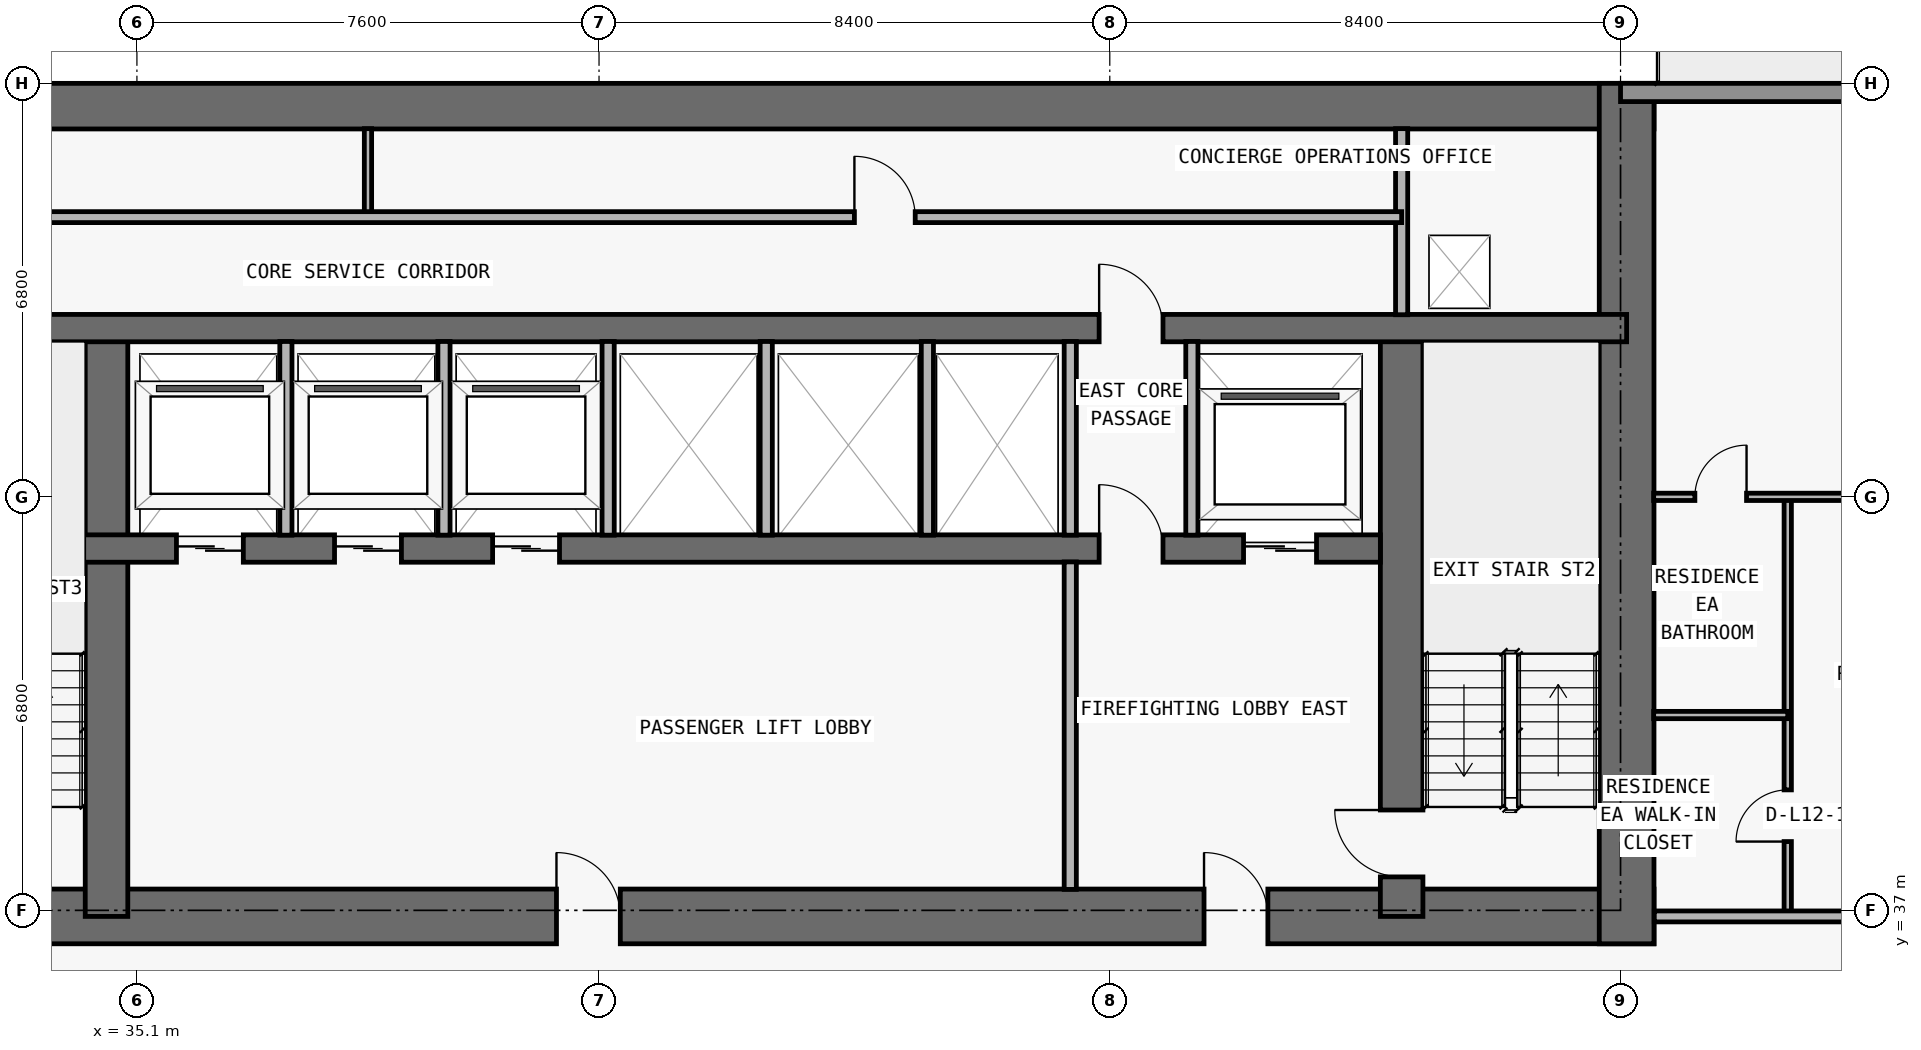
"""IFC4 building model, lengths in metres.
Left out: names, types, materials, properties, quantities, classifications, styles, units other than length and angle.
Written with IfcOpenShell. Run it as: python <this file> out.ifc"""

import sys

from ifc_helpers import new_model, si_unit, direction, frame, frame_2d, origin, place, context, subcontext, project, spatial, rectangle, extrude, element, fill, save


model = new_model("IFC4")
c1 = context("Model", 3, precision=1e-05, world=origin(), true_north=direction((0.0, 1.0)))
c2 = subcontext(c1, "Body", "Model", "MODEL_VIEW")
j1 = project(units=[si_unit("LENGTHUNIT", "METRE"), si_unit("PLANEANGLEUNIT", "RADIAN")], contexts=[c1])
p1 = place(None, origin())
s1 = spatial("IfcSite", under=j1, at=p1, CompositionType="ELEMENT")
p2 = place(p1, origin())
s2 = spatial("IfcBuilding", under=s1, at=p2, CompositionType="ELEMENT")
p3 = place(p2, frame((0.0, 0.0, 49.8)))
s3 = spatial("IfcBuildingStorey", under=s2, at=p3, CompositionType="ELEMENT", Elevation=49.8)
p4 = place(p3, frame((17.75, 36.9, 0.0), z_axis=(0.0, 0.0, 1.0), x_axis=(1.0, 0.0, 0.0)))
e1 = element("IfcWall", 1, at=p4, inside=s3, PredefinedType="SHEAR", context=c2, shape_type="SweptSolid", body=[
    extrude(rectangle(XDim=42.3, YDim=0.9, at=frame_2d((21.15, 0.0))), origin(), (0.0, 0.0, 1.0), 3.05),
])
p5 = place(p4, frame((14.55, 0.0, 0.0)))
e2 = element("IfcOpeningElement", 2, at=p5, cuts=e1, PredefinedType="OPENING", context=c2, shape_type="SweptSolid", body=[
    extrude(rectangle(XDim=1.1, YDim=2.15, at=frame_2d((0.55, 1.075))), frame((0.0, 0.46, 0.0), z_axis=(0.0, -1.0, 0.0), x_axis=(1.0, 0.0, 0.0)), (0.0, 0.0, 1.0), 0.92),
])
p6 = place(p4, frame((6.4, 0.0, 0.0)))
e3 = element("IfcOpeningElement", 3, at=p6, cuts=e1, PredefinedType="OPENING", context=c2, shape_type="SweptSolid", body=[
    extrude(rectangle(XDim=1.05, YDim=2.15, at=frame_2d((0.525, 1.075))), frame((0.0, 0.46, 0.0), z_axis=(0.0, -1.0, 0.0), x_axis=(1.0, 0.0, 0.0)), (0.0, 0.0, 1.0), 0.92),
])
p7 = place(p4, frame((34.9, 0.0, 0.0)))
e4 = element("IfcOpeningElement", 4, at=p7, cuts=e1, PredefinedType="OPENING", context=c2, shape_type="SweptSolid", body=[
    extrude(rectangle(XDim=1.05, YDim=2.15, at=frame_2d((0.525, 1.075))), frame((0.0, 0.46, 0.0), z_axis=(0.0, -1.0, 0.0), x_axis=(1.0, 0.0, 0.0)), (0.0, 0.0, 1.0), 0.92),
])
p8 = place(p4, frame((11.012, 0.0, 0.0)))
e5 = element("IfcOpeningElement", 5, at=p8, cuts=e1, PredefinedType="OPENING", context=c2, shape_type="SweptSolid", body=[
    extrude(rectangle(XDim=1.05, YDim=2.15, at=frame_2d((0.525, 1.075))), frame((0.0, 0.46, 0.0), z_axis=(0.0, -1.0, 0.0), x_axis=(1.0, 0.0, 0.0)), (0.0, 0.0, 1.0), 0.92),
])
p9 = place(p4, frame((24.25, 0.0, 0.0)))
e6 = element("IfcOpeningElement", 6, at=p9, cuts=e1, PredefinedType="OPENING", context=c2, shape_type="SweptSolid", body=[
    extrude(rectangle(XDim=1.05, YDim=2.15, at=frame_2d((0.525, 1.075))), frame((0.0, 0.46, 0.0), z_axis=(0.0, -1.0, 0.0), x_axis=(1.0, 0.0, 0.0)), (0.0, 0.0, 1.0), 0.92),
])
p10 = place(p3, frame((17.75, 50.225, 0.0), z_axis=(0.0, 0.0, 1.0), x_axis=(1.0, 0.0, 0.0)))
e7 = element("IfcWall", 7, at=p10, inside=s3, PredefinedType="SHEAR", context=c2, shape_type="SweptSolid", body=[
    extrude(rectangle(XDim=42.3, YDim=0.75, at=frame_2d((21.15, 0.0))), origin(), (0.0, 0.0, 1.0), 3.05),
])
p11 = place(p3, frame((59.6, 36.45, 0.0), z_axis=(0.0, 0.0, 1.0), x_axis=(0.0, 1.0, 0.0)))
e8 = element("IfcWall", 8, at=p11, inside=s3, PredefinedType="SHEAR", context=c2, shape_type="SweptSolid", body=[
    extrude(rectangle(XDim=14.15, YDim=0.9, at=frame_2d((7.075, 0.0))), origin(), (0.0, 0.0, 1.0), 3.05),
])
p12 = place(p3, frame((55.9, 36.9, 0.0), z_axis=(0.0, 0.0, 1.0), x_axis=(0.0, 1.0, 0.0)))
e9 = element("IfcWall", 9, at=p12, inside=s3, PredefinedType="SHEAR", context=c2, shape_type="SweptSolid", body=[
    extrude(rectangle(XDim=9.675, YDim=0.7, at=frame_2d((4.837, 0.0))), origin(), (0.0, 0.0, 1.0), 3.05),
])
p13 = place(p12, frame((0.65, 0.0, 0.0)))
e10 = element("IfcOpeningElement", 10, at=p13, cuts=e9, PredefinedType="OPENING", context=c2, shape_type="SweptSolid", body=[
    extrude(rectangle(XDim=1.1, YDim=2.15, at=frame_2d((0.55, 1.075))), frame((0.0, 0.36, 0.0), z_axis=(0.0, -1.0, 0.0), x_axis=(1.0, 0.0, 0.0)), (0.0, 0.0, 1.0), 0.72),
])
p14 = place(p3, frame((34.6, 36.9, 0.0), z_axis=(0.0, 0.0, 1.0), x_axis=(0.0, 1.0, 0.0)))
e11 = element("IfcWall", 11, at=p14, inside=s3, PredefinedType="SHEAR", context=c2, shape_type="SweptSolid", body=[
    extrude(rectangle(XDim=9.675, YDim=0.7, at=frame_2d((4.837, 0.0))), origin(), (0.0, 0.0, 1.0), 3.05),
])
p15 = place(p3, frame((22.25, 42.95, 0.0), z_axis=(0.0, 0.0, 1.0), x_axis=(1.0, 0.0, 0.0)))
e12 = element("IfcWall", 12, at=p15, inside=s3, PredefinedType="SHEAR", context=c2, shape_type="SweptSolid", body=[
    extrude(rectangle(XDim=33.3, YDim=0.45, at=frame_2d((16.65, 0.0))), origin(), (0.0, 0.0, 1.0), 3.05),
])
p16 = place(p15, frame((1.05, 0.0, 0.0)))
e13 = element("IfcOpeningElement", 13, at=p16, cuts=e12, PredefinedType="OPENING", context=c2, shape_type="SweptSolid", body=[
    extrude(rectangle(XDim=1.2, YDim=2.2, at=frame_2d((0.6, 1.1))), frame((0.0, 0.235, 0.0), z_axis=(0.0, -1.0, 0.0), x_axis=(1.0, 0.0, 0.0)), (0.0, 0.0, 1.0), 0.47),
])
p17 = place(p15, frame((31.05, 0.0, 0.0)))
e14 = element("IfcOpeningElement", 14, at=p17, cuts=e12, PredefinedType="OPENING", context=c2, shape_type="SweptSolid", body=[
    extrude(rectangle(XDim=1.2, YDim=2.2, at=frame_2d((0.6, 1.1))), frame((0.0, 0.235, 0.0), z_axis=(0.0, -1.0, 0.0), x_axis=(1.0, 0.0, 0.0)), (0.0, 0.0, 1.0), 0.47),
])
p18 = place(p15, frame((13.5, 0.0, 0.0)))
e15 = element("IfcOpeningElement", 15, at=p18, cuts=e12, PredefinedType="OPENING", context=c2, shape_type="SweptSolid", body=[
    extrude(rectangle(XDim=1.1, YDim=2.2, at=frame_2d((0.55, 1.1))), frame((0.0, 0.235, 0.0), z_axis=(0.0, -1.0, 0.0), x_axis=(1.0, 0.0, 0.0)), (0.0, 0.0, 1.0), 0.47),
])
p19 = place(p15, frame((16.1, 0.0, 0.0)))
e16 = element("IfcOpeningElement", 16, at=p19, cuts=e12, PredefinedType="OPENING", context=c2, shape_type="SweptSolid", body=[
    extrude(rectangle(XDim=1.1, YDim=2.2, at=frame_2d((0.55, 1.1))), frame((0.0, 0.235, 0.0), z_axis=(0.0, -1.0, 0.0), x_axis=(1.0, 0.0, 0.0)), (0.0, 0.0, 1.0), 0.47),
])
p20 = place(p15, frame((18.7, 0.0, 0.0)))
e17 = element("IfcOpeningElement", 17, at=p20, cuts=e12, PredefinedType="OPENING", context=c2, shape_type="SweptSolid", body=[
    extrude(rectangle(XDim=1.1, YDim=2.2, at=frame_2d((0.55, 1.1))), frame((0.0, 0.235, 0.0), z_axis=(0.0, -1.0, 0.0), x_axis=(1.0, 0.0, 0.0)), (0.0, 0.0, 1.0), 0.47),
])
p21 = place(p15, frame((3.625, 0.0, 0.0)))
e18 = element("IfcOpeningElement", 18, at=p21, cuts=e12, PredefinedType="OPENING", context=c2, shape_type="SweptSolid", body=[
    extrude(rectangle(XDim=1.05, YDim=2.15, at=frame_2d((0.525, 1.075))), frame((0.0, 0.235, 0.0), z_axis=(0.0, -1.0, 0.0), x_axis=(1.0, 0.0, 0.0)), (0.0, 0.0, 1.0), 0.47),
])
p22 = place(p15, frame((28.675, 0.0, 0.0)))
e19 = element("IfcOpeningElement", 19, at=p22, cuts=e12, PredefinedType="OPENING", context=c2, shape_type="SweptSolid", body=[
    extrude(rectangle(XDim=1.05, YDim=2.15, at=frame_2d((0.525, 1.075))), frame((0.0, 0.235, 0.0), z_axis=(0.0, -1.0, 0.0), x_axis=(1.0, 0.0, 0.0)), (0.0, 0.0, 1.0), 0.47),
])
p23 = place(p3, frame((18.2, 46.575, 0.0), z_axis=(0.0, 0.0, 1.0), x_axis=(1.0, 0.0, 0.0)))
e20 = element("IfcWall", 20, at=p23, inside=s3, PredefinedType="SHEAR", context=c2, shape_type="SweptSolid", body=[
    extrude(rectangle(XDim=41.4, YDim=0.45, at=frame_2d((20.7, 0.0))), origin(), (0.0, 0.0, 1.0), 3.05),
])
p24 = place(p23, frame((7.675, 0.0, 0.0)))
e21 = element("IfcOpeningElement", 21, at=p24, cuts=e20, PredefinedType="OPENING", context=c2, shape_type="SweptSolid", body=[
    extrude(rectangle(XDim=1.05, YDim=2.15, at=frame_2d((0.525, 1.075))), frame((0.0, 0.235, 0.0), z_axis=(0.0, -1.0, 0.0), x_axis=(1.0, 0.0, 0.0)), (0.0, 0.0, 1.0), 0.47),
])
p25 = place(p23, frame((32.725, 0.0, 0.0)))
e22 = element("IfcOpeningElement", 22, at=p25, cuts=e20, PredefinedType="OPENING", context=c2, shape_type="SweptSolid", body=[
    extrude(rectangle(XDim=1.05, YDim=2.15, at=frame_2d((0.525, 1.075))), frame((0.0, 0.235, 0.0), z_axis=(0.0, -1.0, 0.0), x_axis=(1.0, 0.0, 0.0)), (0.0, 0.0, 1.0), 0.47),
])
p26 = place(p3, frame((59.5, 50.45, 0.0), z_axis=(0.0, 0.0, 1.0), x_axis=(1.0, 0.0, 0.0)))
e23 = element("IfcWall", 23, at=p26, inside=s3, PredefinedType="STANDARD", context=c2, shape_type="SweptSolid", body=[
    extrude(rectangle(XDim=13.2, YDim=0.3, at=frame_2d((6.6, 0.0))), origin(), (0.0, 0.0, 1.0), 3.05),
])
p27 = place(p26, frame((5.6, 0.0, 0.0)))
e24 = element("IfcOpeningElement", 24, at=p27, cuts=e23, PredefinedType="OPENING", context=c2, shape_type="SweptSolid", body=[
    extrude(rectangle(XDim=2.0, YDim=2.3, at=frame_2d((1.0, 1.15))), frame((0.0, 0.16, 0.0), z_axis=(0.0, -1.0, 0.0), x_axis=(1.0, 0.0, 0.0)), (0.0, 0.0, 1.0), 0.32),
])
p28 = place(p3, frame((37.55, 43.17, 0.0), z_axis=(0.0, 0.0, 1.0), x_axis=(0.0, 1.0, 0.0)))
e25 = element("IfcWall", 25, at=p28, inside=s3, PredefinedType="PARTITIONING", context=c2, shape_type="SweptSolid", body=[
    extrude(rectangle(XDim=3.185, YDim=0.2, at=frame_2d((1.593, 0.0))), origin(), (0.0, 0.0, 1.0), 3.05),
])
p29 = place(p3, frame((38.9, 48.4, 0.0), z_axis=(0.0, 0.0, 1.0), x_axis=(0.0, 1.0, 0.0)))
e26 = element("IfcWall", 26, at=p29, inside=s3, PredefinedType="PARTITIONING", context=c2, shape_type="SweptSolid", body=[
    extrude(rectangle(XDim=1.455, YDim=0.12, at=frame_2d((0.728, 0.0))), origin(), (0.0, 0.0, 1.0), 3.05),
])
for number, where, z_axis, x_axis in (
    (27, (40.15, 43.17, 0.0), (0.0, 0.0, 1.0), (0.0, 1.0, 0.0)),
    (28, (42.85, 43.17, 0.0), (0.0, 0.0, 1.0), (0.0, 1.0, 0.0)),
    (29, (45.45, 43.17, 0.0), (0.0, 0.0, 1.0), (0.0, 1.0, 0.0)),
    (30, (48.1, 43.17, 0.0), (0.0, 0.0, 1.0), (0.0, 1.0, 0.0)),
):
    element("IfcWall", number, at=place(p3, frame(where, z_axis=z_axis, x_axis=x_axis)), inside=s3, PredefinedType="PARTITIONING", context=c2, shape_type="SweptSolid", body=[
        extrude(rectangle(XDim=3.185, YDim=0.2, at=frame_2d((1.593, 0.0))), origin(), (0.0, 0.0, 1.0), 3.05),
    ])
p30 = place(p3, frame((50.45, 37.345, 0.0), z_axis=(0.0, 0.0, 1.0), x_axis=(0.0, 1.0, 0.0)))
e31 = element("IfcWall", 31, at=p30, inside=s3, PredefinedType="PARTITIONING", context=c2, shape_type="SweptSolid", body=[
    extrude(rectangle(XDim=5.385, YDim=0.2, at=frame_2d((2.692, 0.0))), origin(), (0.0, 0.0, 1.0), 3.05),
])
for number, where, z_axis, x_axis in (
    (32, (50.45, 43.17, 0.0), (0.0, 0.0, 1.0), (0.0, 1.0, 0.0)),
    (33, (52.45, 43.17, 0.0), (0.0, 0.0, 1.0), (0.0, 1.0, 0.0)),
):
    element("IfcWall", number, at=place(p3, frame(where, z_axis=z_axis, x_axis=x_axis)), inside=s3, PredefinedType="PARTITIONING", context=c2, shape_type="SweptSolid", body=[
        extrude(rectangle(XDim=3.185, YDim=0.2, at=frame_2d((1.593, 0.0))), origin(), (0.0, 0.0, 1.0), 3.05),
    ])
p31 = place(p3, frame((55.9, 46.795, 0.0), z_axis=(0.0, 0.0, 1.0), x_axis=(0.0, 1.0, 0.0)))
e34 = element("IfcWall", 34, at=p31, inside=s3, PredefinedType="PARTITIONING", context=c2, shape_type="SweptSolid", body=[
    extrude(rectangle(XDim=3.06, YDim=0.2, at=frame_2d((1.53, 0.0))), origin(), (0.0, 0.0, 1.0), 3.05),
])
p32 = place(p3, frame((62.25, 36.9, 0.0), z_axis=(0.0, 0.0, 1.0), x_axis=(0.0, 1.0, 0.0)))
e35 = element("IfcWall", 35, at=p32, inside=s3, PredefinedType="PARTITIONING", context=c2, shape_type="SweptSolid", body=[
    extrude(rectangle(XDim=6.9, YDim=0.12, at=frame_2d((3.45, 0.0))), origin(), (0.0, 0.0, 1.0), 2.486),
])
p33 = place(p32, frame((1.231, 0.0, 0.0)))
e36 = element("IfcOpeningElement", 36, at=p33, cuts=e35, PredefinedType="OPENING", context=c2, shape_type="SweptSolid", body=[
    extrude(rectangle(XDim=0.85, YDim=2.1, at=frame_2d((0.425, 1.05))), frame((0.0, 0.07, 0.0), z_axis=(0.0, -1.0, 0.0), x_axis=(1.0, 0.0, 0.0)), (0.0, 0.0, 1.0), 0.14),
])
p34 = place(p3, frame((60.055, 36.9, 0.0), z_axis=(0.0, 0.0, 1.0), x_axis=(1.0, 0.0, 0.0)))
e37 = element("IfcWall", 37, at=p34, inside=s3, PredefinedType="PARTITIONING", context=c2, shape_type="SweptSolid", body=[
    extrude(rectangle(XDim=12.645, YDim=0.18, at=frame_2d((6.323, 0.0))), origin(), (0.0, 0.0, 1.0), 3.05),
])
p35 = place(p34, frame((4.52, 0.0, 0.0)))
e38 = element("IfcOpeningElement", 38, at=p35, cuts=e37, PredefinedType="OPENING", context=c2, shape_type="SweptSolid", body=[
    extrude(rectangle(XDim=1.0, YDim=2.2, at=frame_2d((0.5, 1.1))), frame((0.0, 0.1, 0.0), z_axis=(0.0, -1.0, 0.0), x_axis=(1.0, 0.0, 0.0)), (0.0, 0.0, 1.0), 0.2),
])
p36 = place(p3, frame((60.045, 40.212, 0.0), z_axis=(0.0, 0.0, 1.0), x_axis=(1.0, 0.0, 0.0)))
e39 = element("IfcWall", 39, at=p36, inside=s3, PredefinedType="PARTITIONING", context=c2, shape_type="SweptSolid", body=[
    extrude(rectangle(XDim=2.205, YDim=0.12, at=frame_2d((1.103, 0.0))), origin(), (0.0, 0.0, 1.0), 3.05),
])
p37 = place(p3, frame((60.045, 43.8, 0.0), z_axis=(0.0, 0.0, 1.0), x_axis=(1.0, 0.0, 0.0)))
e40 = element("IfcWall", 40, at=p37, inside=s3, PredefinedType="PARTITIONING", context=c2, shape_type="SweptSolid", body=[
    extrude(rectangle(XDim=15.96, YDim=0.12, at=frame_2d((7.98, 0.0))), origin(), (0.0, 0.0, 1.0), 2.339),
])
p38 = place(p37, frame((9.805, 0.0, 0.0)))
e41 = element("IfcOpeningElement", 41, at=p38, cuts=e40, PredefinedType="OPENING", context=c2, shape_type="SweptSolid", body=[
    extrude(rectangle(XDim=0.9, YDim=2.15, at=frame_2d((0.45, 1.075))), frame((0.0, 0.07, 0.0), z_axis=(0.0, -1.0, 0.0), x_axis=(1.0, 0.0, 0.0)), (0.0, 0.0, 1.0), 0.14),
])
p39 = place(p37, frame((4.58, 0.0, 0.0)))
e42 = element("IfcOpeningElement", 42, at=p39, cuts=e40, PredefinedType="OPENING", context=c2, shape_type="SweptSolid", body=[
    extrude(rectangle(XDim=0.9, YDim=2.15, at=frame_2d((0.45, 1.075))), frame((0.0, 0.07, 0.0), z_axis=(0.0, -1.0, 0.0), x_axis=(1.0, 0.0, 0.0)), (0.0, 0.0, 1.0), 0.14),
])
p40 = place(p37, frame((0.677, 0.0, 0.0)))
e43 = element("IfcOpeningElement", 43, at=p40, cuts=e40, PredefinedType="OPENING", context=c2, shape_type="SweptSolid", body=[
    extrude(rectangle(XDim=0.85, YDim=2.1, at=frame_2d((0.425, 1.05))), frame((0.0, 0.07, 0.0), z_axis=(0.0, -1.0, 0.0), x_axis=(1.0, 0.0, 0.0)), (0.0, 0.0, 1.0), 0.14),
])
p41 = place(p3, frame((21.9, 48.4, 0.0), z_axis=(0.0, 0.0, 1.0), x_axis=(1.0, 0.0, 0.0)))
e44 = element("IfcWall", 44, at=p41, inside=s3, PredefinedType="PARTITIONING", context=c2, shape_type="SweptSolid", body=[
    extrude(rectangle(XDim=34.0, YDim=0.18, at=frame_2d((17.0, 0.0))), origin(), (0.0, 0.0, 1.0), 3.05),
])
p42 = place(p41, frame((8.0, 0.0, 0.0)))
e45 = element("IfcOpeningElement", 45, at=p42, cuts=e44, PredefinedType="OPENING", context=c2, shape_type="SweptSolid", body=[
    extrude(rectangle(XDim=1.0, YDim=2.2, at=frame_2d((0.5, 1.1))), frame((0.0, 0.1, 0.0), z_axis=(0.0, -1.0, 0.0), x_axis=(1.0, 0.0, 0.0)), (0.0, 0.0, 1.0), 0.2),
])
p43 = place(p41, frame((25.0, 0.0, 0.0)))
e46 = element("IfcOpeningElement", 46, at=p43, cuts=e44, PredefinedType="OPENING", context=c2, shape_type="SweptSolid", body=[
    extrude(rectangle(XDim=1.0, YDim=2.2, at=frame_2d((0.5, 1.1))), frame((0.0, 0.1, 0.0), z_axis=(0.0, -1.0, 0.0), x_axis=(1.0, 0.0, 0.0)), (0.0, 0.0, 1.0), 0.2),
])
p44 = place(p17, origin())
e47 = element("IfcDoor", 47, at=p44, inside=s3, OperationType="DOUBLE_DOOR_SLIDING", PredefinedType="DOOR", context=c2, shape_type="SweptSolid", body=[
    extrude(rectangle(XDim=1.2, YDim=2.2, at=frame_2d((0.6, 1.1))), frame((0.0, 0.025, 0.0), z_axis=(0.0, -1.0, 0.0), x_axis=(1.0, 0.0, 0.0)), (0.0, 0.0, 1.0), 0.05),
])
fill(e14, e47)
p45 = place(p18, origin())
e48 = element("IfcDoor", 48, at=p45, inside=s3, OperationType="DOUBLE_DOOR_SLIDING", PredefinedType="DOOR", context=c2, shape_type="SweptSolid", body=[
    extrude(rectangle(XDim=1.1, YDim=2.2, at=frame_2d((0.55, 1.1))), frame((0.0, 0.025, 0.0), z_axis=(0.0, -1.0, 0.0), x_axis=(1.0, 0.0, 0.0)), (0.0, 0.0, 1.0), 0.05),
])
fill(e15, e48)
p46 = place(p19, origin())
e49 = element("IfcDoor", 49, at=p46, inside=s3, OperationType="DOUBLE_DOOR_SLIDING", PredefinedType="DOOR", context=c2, shape_type="SweptSolid", body=[
    extrude(rectangle(XDim=1.1, YDim=2.2, at=frame_2d((0.55, 1.1))), frame((0.0, 0.025, 0.0), z_axis=(0.0, -1.0, 0.0), x_axis=(1.0, 0.0, 0.0)), (0.0, 0.0, 1.0), 0.05),
])
fill(e16, e49)
p47 = place(p20, origin())
e50 = element("IfcDoor", 50, at=p47, inside=s3, OperationType="DOUBLE_DOOR_SLIDING", PredefinedType="DOOR", context=c2, shape_type="SweptSolid", body=[
    extrude(rectangle(XDim=1.1, YDim=2.2, at=frame_2d((0.55, 1.1))), frame((0.0, 0.025, 0.0), z_axis=(0.0, -1.0, 0.0), x_axis=(1.0, 0.0, 0.0)), (0.0, 0.0, 1.0), 0.05),
])
fill(e17, e50)
p48 = place(p7, origin())
e51 = element("IfcDoor", 51, at=p48, inside=s3, OperationType="SINGLE_SWING_LEFT", PredefinedType="DOOR", context=c2, shape_type="SweptSolid", body=[
    extrude(rectangle(XDim=1.05, YDim=2.15, at=frame_2d((0.525, 1.075))), frame((0.0, 0.025, 0.0), z_axis=(0.0, -1.0, 0.0), x_axis=(1.0, 0.0, 0.0)), (0.0, 0.0, 1.0), 0.05),
])
fill(e4, e51)
p49 = place(p13, origin())
e52 = element("IfcDoor", 52, at=p49, inside=s3, OperationType="SINGLE_SWING_RIGHT", PredefinedType="DOOR", context=c2, shape_type="SweptSolid", body=[
    extrude(rectangle(XDim=1.1, YDim=2.15, at=frame_2d((0.55, 1.075))), frame((0.0, 0.025, 0.0), z_axis=(0.0, -1.0, 0.0), x_axis=(1.0, 0.0, 0.0)), (0.0, 0.0, 1.0), 0.05),
])
fill(e10, e52)
p50 = place(p22, origin())
e53 = element("IfcDoor", 53, at=p50, inside=s3, OperationType="SINGLE_SWING_LEFT", PredefinedType="DOOR", context=c2, shape_type="SweptSolid", body=[
    extrude(rectangle(XDim=1.05, YDim=2.15, at=frame_2d((0.525, 1.075))), frame((0.0, 0.025, 0.0), z_axis=(0.0, -1.0, 0.0), x_axis=(1.0, 0.0, 0.0)), (0.0, 0.0, 1.0), 0.05),
])
fill(e19, e53)
p51 = place(p9, origin())
e54 = element("IfcDoor", 54, at=p51, inside=s3, OperationType="SINGLE_SWING_LEFT", PredefinedType="DOOR", context=c2, shape_type="SweptSolid", body=[
    extrude(rectangle(XDim=1.05, YDim=2.15, at=frame_2d((0.525, 1.075))), frame((0.0, 0.025, 0.0), z_axis=(0.0, -1.0, 0.0), x_axis=(1.0, 0.0, 0.0)), (0.0, 0.0, 1.0), 0.05),
])
fill(e6, e54)
p52 = place(p25, origin())
e55 = element("IfcDoor", 55, at=p52, inside=s3, OperationType="SINGLE_SWING_LEFT", PredefinedType="DOOR", context=c2, shape_type="SweptSolid", body=[
    extrude(rectangle(XDim=1.05, YDim=2.15, at=frame_2d((0.525, 1.075))), frame((0.0, 0.025, 0.0), z_axis=(0.0, -1.0, 0.0), x_axis=(1.0, 0.0, 0.0)), (0.0, 0.0, 1.0), 0.05),
])
fill(e22, e55)
p53 = place(p43, origin())
e56 = element("IfcDoor", 56, at=p53, inside=s3, OperationType="SINGLE_SWING_LEFT", PredefinedType="DOOR", context=c2, shape_type="SweptSolid", body=[
    extrude(rectangle(XDim=1.0, YDim=2.2, at=frame_2d((0.5, 1.1))), frame((0.0, 0.025, 0.0), z_axis=(0.0, -1.0, 0.0), x_axis=(1.0, 0.0, 0.0)), (0.0, 0.0, 1.0), 0.05),
])
fill(e46, e56)
p54 = place(p33, origin())
e57 = element("IfcDoor", 57, at=p54, inside=s3, OperationType="SINGLE_SWING_LEFT", PredefinedType="DOOR", context=c2, shape_type="SweptSolid", body=[
    extrude(rectangle(XDim=0.85, YDim=2.1, at=frame_2d((0.425, 1.05))), frame((0.0, 0.025, 0.0), z_axis=(0.0, -1.0, 0.0), x_axis=(1.0, 0.0, 0.0)), (0.0, 0.0, 1.0), 0.05),
])
fill(e36, e57)
p55 = place(p40, origin())
e58 = element("IfcDoor", 58, at=p55, inside=s3, OperationType="SINGLE_SWING_RIGHT", PredefinedType="DOOR", context=c2, shape_type="SweptSolid", body=[
    extrude(rectangle(XDim=0.85, YDim=2.1, at=frame_2d((0.425, 1.05))), frame((0.0, 0.025, 0.0), z_axis=(0.0, -1.0, 0.0), x_axis=(1.0, 0.0, 0.0)), (0.0, 0.0, 1.0), 0.05),
])
fill(e43, e58)
save(model, sys.argv[1])
